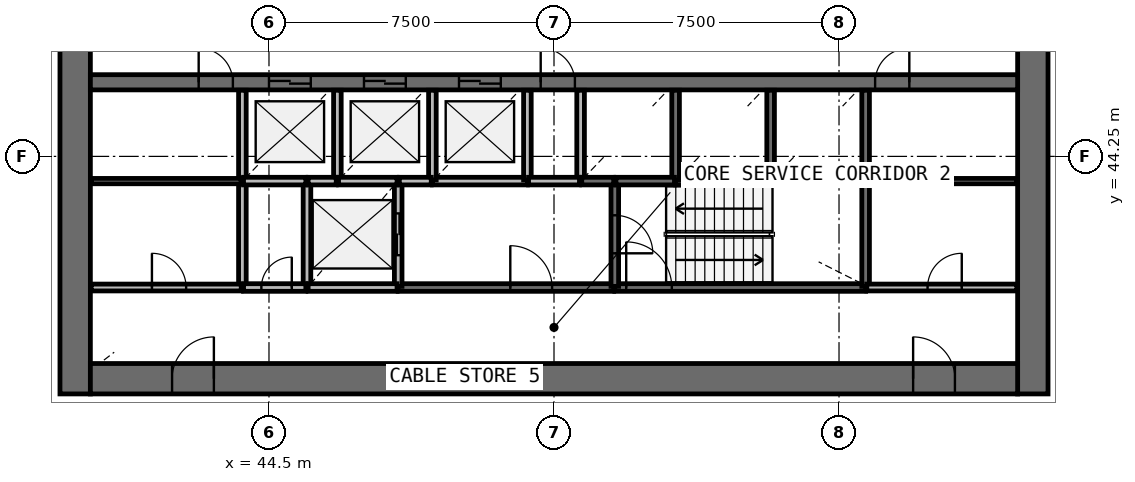
"""IFC4 building model, lengths in metres.
Left out: names, types, materials, properties, quantities, classifications, styles, units other than length and angle.
Written with IfcOpenShell. Run it as: python <this file> out.ifc"""

import sys

from ifc_helpers import new_model, si_unit, direction, frame, frame_2d, origin, place, context, subcontext, project, spatial, rectangle, extrude, source, transform, mapped, element, fill, save


model = new_model("IFC4")
c1 = context("Model", 3, precision=1e-05, world=origin(), true_north=direction((0.0, 1.0)))
c2 = subcontext(c1, "Body", "Model", "MODEL_VIEW")
j1 = project(units=[si_unit("LENGTHUNIT", "METRE"), si_unit("PLANEANGLEUNIT", "RADIAN")], contexts=[c1])
p1 = place(None, origin())
s1 = spatial("IfcSite", under=j1, at=p1, CompositionType="ELEMENT")
p2 = place(p1, origin())
s2 = spatial("IfcBuilding", under=s1, at=p2, CompositionType="ELEMENT")
p3 = place(p2, frame((0.0, 0.0, 120.8)))
s3 = spatial("IfcBuildingStorey", under=s2, at=p3, CompositionType="ELEMENT", Elevation=120.8)
p4 = place(p3, frame((64.6, 38.0, 0.0), z_axis=(0.0, 0.0, 1.0), x_axis=(0.0, 1.0, 0.0)))
e1 = element("IfcWall", 1, at=p4, inside=s3, PredefinedType="SHEAR", context=c2, shape_type="SweptSolid", body=[
    extrude(rectangle(XDim=20.0, YDim=0.8, at=frame_2d((10.0, 0.0))), origin(), (0.0, 0.0, 1.0), 4.1),
])
p5 = place(p4, frame((9.1, 0.0, 0.0)))
e2 = element("IfcOpeningElement", 2, at=p5, cuts=e1, PredefinedType="OPENING", context=c2, shape_type="SweptSolid", body=[
    extrude(rectangle(XDim=1.8, YDim=2.1, at=frame_2d((0.9, 1.05))), frame((0.0, 0.41, 0.0), z_axis=(0.0, -1.0, 0.0), x_axis=(1.0, 0.0, 0.0)), (0.0, 0.0, 1.0), 0.82),
])
p6 = place(p3, frame((39.4, 58.0, 0.0), z_axis=(0.0, 0.0, 1.0), x_axis=(0.0, -1.0, 0.0)))
e3 = element("IfcWall", 3, at=p6, inside=s3, PredefinedType="SHEAR", context=c2, shape_type="SweptSolid", body=[
    extrude(rectangle(XDim=20.0, YDim=0.8, at=frame_2d((10.0, 0.0))), origin(), (0.0, 0.0, 1.0), 4.1),
])
p7 = place(p6, frame((9.1, 0.0, 0.0)))
e4 = element("IfcOpeningElement", 4, at=p7, cuts=e3, PredefinedType="OPENING", context=c2, shape_type="SweptSolid", body=[
    extrude(rectangle(XDim=1.8, YDim=2.1, at=frame_2d((0.9, 1.05))), frame((0.0, 0.41, 0.0), z_axis=(0.0, -1.0, 0.0), x_axis=(1.0, 0.0, 0.0)), (0.0, 0.0, 1.0), 0.82),
])
p8 = place(p3, frame((39.8, 38.4, 0.0), z_axis=(0.0, 0.0, 1.0), x_axis=(1.0, 0.0, 0.0)))
e5 = element("IfcWall", 5, at=p8, inside=s3, PredefinedType="SHEAR", context=c2, shape_type="SweptSolid", body=[
    extrude(rectangle(XDim=24.4, YDim=0.8, at=frame_2d((12.2, 0.0))), origin(), (0.0, 0.0, 1.0), 4.1),
])
p9 = place(p8, frame((21.65, 0.0, 0.0)))
e6 = element("IfcOpeningElement", 6, at=p9, cuts=e5, PredefinedType="OPENING", context=c2, shape_type="SweptSolid", body=[
    extrude(rectangle(XDim=1.1, YDim=2.1, at=frame_2d((0.55, 1.05))), frame((0.0, 0.41, 0.0), z_axis=(0.0, -1.0, 0.0), x_axis=(1.0, 0.0, 0.0)), (0.0, 0.0, 1.0), 0.82),
])
p10 = place(p8, frame((2.15, 0.0, 0.0)))
e7 = element("IfcOpeningElement", 7, at=p10, cuts=e5, PredefinedType="OPENING", context=c2, shape_type="SweptSolid", body=[
    extrude(rectangle(XDim=1.1, YDim=2.1, at=frame_2d((0.55, 1.05))), frame((0.0, 0.41, 0.0), z_axis=(0.0, -1.0, 0.0), x_axis=(1.0, 0.0, 0.0)), (0.0, 0.0, 1.0), 0.82),
])
p11 = place(p3, frame((39.8, 46.2, 0.0), z_axis=(0.0, 0.0, 1.0), x_axis=(1.0, 0.0, 0.0)))
e8 = element("IfcWall", 8, at=p11, inside=s3, PredefinedType="SHEAR", context=c2, shape_type="SweptSolid", body=[
    extrude(rectangle(XDim=24.4, YDim=0.4, at=frame_2d((12.2, 0.0))), origin(), (0.0, 0.0, 1.0), 4.1),
])
p12 = place(p11, frame((4.7, 0.0, 0.0)))
e9 = element("IfcOpeningElement", 9, at=p12, cuts=e8, PredefinedType="OPENING", context=c2, shape_type="SweptSolid", body=[
    extrude(rectangle(XDim=1.1, YDim=2.1, at=frame_2d((0.55, 1.05))), frame((0.0, 0.21, 0.0), z_axis=(0.0, -1.0, 0.0), x_axis=(1.0, 0.0, 0.0)), (0.0, 0.0, 1.0), 0.42),
])
p13 = place(p11, frame((7.2, 0.0, 0.0)))
e10 = element("IfcOpeningElement", 10, at=p13, cuts=e8, PredefinedType="OPENING", context=c2, shape_type="SweptSolid", body=[
    extrude(rectangle(XDim=1.1, YDim=2.1, at=frame_2d((0.55, 1.05))), frame((0.0, 0.21, 0.0), z_axis=(0.0, -1.0, 0.0), x_axis=(1.0, 0.0, 0.0)), (0.0, 0.0, 1.0), 0.42),
])
p14 = place(p11, frame((9.7, 0.0, 0.0)))
e11 = element("IfcOpeningElement", 11, at=p14, cuts=e8, PredefinedType="OPENING", context=c2, shape_type="SweptSolid", body=[
    extrude(rectangle(XDim=1.1, YDim=2.1, at=frame_2d((0.55, 1.05))), frame((0.0, 0.21, 0.0), z_axis=(0.0, -1.0, 0.0), x_axis=(1.0, 0.0, 0.0)), (0.0, 0.0, 1.0), 0.42),
])
p15 = place(p11, frame((20.65, 0.0, 0.0)))
e12 = element("IfcOpeningElement", 12, at=p15, cuts=e8, PredefinedType="OPENING", context=c2, shape_type="SweptSolid", body=[
    extrude(rectangle(XDim=0.9, YDim=2.1, at=frame_2d((0.45, 1.05))), frame((0.0, 0.21, 0.0), z_axis=(0.0, -1.0, 0.0), x_axis=(1.0, 0.0, 0.0)), (0.0, 0.0, 1.0), 0.42),
])
p16 = place(p11, frame((2.85, 0.0, 0.0)))
e13 = element("IfcOpeningElement", 13, at=p16, cuts=e8, PredefinedType="OPENING", context=c2, shape_type="SweptSolid", body=[
    extrude(rectangle(XDim=0.9, YDim=2.1, at=frame_2d((0.45, 1.05))), frame((0.0, 0.21, 0.0), z_axis=(0.0, -1.0, 0.0), x_axis=(1.0, 0.0, 0.0)), (0.0, 0.0, 1.0), 0.42),
])
p17 = place(p11, frame((11.85, 0.0, 0.0)))
e14 = element("IfcOpeningElement", 14, at=p17, cuts=e8, PredefinedType="OPENING", context=c2, shape_type="SweptSolid", body=[
    extrude(rectangle(XDim=0.9, YDim=2.1, at=frame_2d((0.45, 1.05))), frame((0.0, 0.21, 0.0), z_axis=(0.0, -1.0, 0.0), x_axis=(1.0, 0.0, 0.0)), (0.0, 0.0, 1.0), 0.42),
])
p18 = place(p3, frame((53.6, 40.8, 0.0), z_axis=(0.0, 0.0, 1.0), x_axis=(1.0, 0.0, 0.0)))
e15 = element("IfcWall", 15, at=p18, inside=s3, PredefinedType="SOLIDWALL", context=c2, shape_type="SweptSolid", body=[
    extrude(rectangle(XDim=6.6, YDim=0.2, at=frame_2d((3.3, 0.0))), origin(), (0.0, 0.0, 1.0), 3.7),
])
p19 = place(p18, frame((0.3, 0.0, 0.0)))
e16 = element("IfcOpeningElement", 16, at=p19, cuts=e15, PredefinedType="OPENING", context=c2, shape_type="SweptSolid", body=[
    extrude(rectangle(XDim=1.2, YDim=2.1, at=frame_2d((0.6, 1.05))), frame((0.0, 0.11, 0.0), z_axis=(0.0, -1.0, 0.0), x_axis=(1.0, 0.0, 0.0)), (0.0, 0.0, 1.0), 0.22),
])
p20 = place(p3, frame((47.9, 40.8, 0.0), z_axis=(0.0, 0.0, 1.0), x_axis=(1.0, 0.0, 0.0)))
e17 = element("IfcWall", 17, at=p20, inside=s3, PredefinedType="SOLIDWALL", context=c2, shape_type="SweptSolid", body=[
    extrude(rectangle(XDim=5.67, YDim=0.2, at=frame_2d((2.835, 0.0))), origin(), (0.0, 0.0, 1.0), 3.7),
])
p21 = place(p20, frame((2.95, 0.0, 0.0)))
e18 = element("IfcOpeningElement", 18, at=p21, cuts=e17, PredefinedType="OPENING", context=c2, shape_type="SweptSolid", body=[
    extrude(rectangle(XDim=1.1, YDim=2.1, at=frame_2d((0.55, 1.05))), frame((0.0, 0.11, 0.0), z_axis=(0.0, -1.0, 0.0), x_axis=(1.0, 0.0, 0.0)), (0.0, 0.0, 1.0), 0.22),
])
for number, where, z_axis, x_axis in (
    (19, (43.8, 43.6, 0.0), (0.0, 0.0, 1.0), (0.0, -1.0, 0.0)),
    (20, (45.5, 43.6, 0.0), (0.0, 0.0, 1.0), (0.0, -1.0, 0.0)),
):
    element("IfcWall", number, at=place(p3, frame(where, z_axis=z_axis, x_axis=x_axis)), inside=s3, PredefinedType="SOLIDWALL", context=c2, shape_type="SweptSolid", body=[
        extrude(rectangle(XDim=2.8, YDim=0.2, at=frame_2d((1.4, 0.0))), origin(), (0.0, 0.0, 1.0), 3.7),
    ])
p22 = place(p3, frame((47.9, 40.83, 0.0), z_axis=(0.0, 0.0, 1.0), x_axis=(0.0, 1.0, 0.0)))
e21 = element("IfcWall", 21, at=p22, inside=s3, PredefinedType="SOLIDWALL", context=c2, shape_type="SweptSolid", body=[
    extrude(rectangle(XDim=2.77, YDim=0.2, at=frame_2d((1.385, 0.0))), origin(), (0.0, 0.0, 1.0), 3.7),
])
p23 = place(p22, frame((0.82, 0.0, 0.0)))
e22 = element("IfcOpeningElement", 22, at=p23, cuts=e21, PredefinedType="OPENING", context=c2, shape_type="SweptSolid", body=[
    extrude(rectangle(XDim=1.1, YDim=2.1, at=frame_2d((0.55, 1.05))), frame((0.0, 0.11, 0.0), z_axis=(0.0, -1.0, 0.0), x_axis=(1.0, 0.0, 0.0)), (0.0, 0.0, 1.0), 0.22),
])
p24 = place(p3, frame((60.2, 40.83, 0.0), z_axis=(0.0, 0.0, 1.0), x_axis=(0.0, 1.0, 0.0)))
e23 = element("IfcWall", 23, at=p24, inside=s3, PredefinedType="SOLIDWALL", context=c2, shape_type="SweptSolid", body=[
    extrude(rectangle(XDim=2.77, YDim=0.2, at=frame_2d((1.385, 0.0))), origin(), (0.0, 0.0, 1.0), 3.7),
])
p25 = place(p3, frame((53.6, 43.6, 0.0), z_axis=(0.0, 0.0, 1.0), x_axis=(0.0, -1.0, 0.0)))
e24 = element("IfcWall", 24, at=p25, inside=s3, PredefinedType="SOLIDWALL", context=c2, shape_type="SweptSolid", body=[
    extrude(rectangle(XDim=2.77, YDim=0.2, at=frame_2d((1.385, 0.0))), origin(), (0.0, 0.0, 1.0), 3.7),
])
p26 = place(p25, frame((0.9, 0.0, 0.0)))
e25 = element("IfcOpeningElement", 25, at=p26, cuts=e24, PredefinedType="OPENING", context=c2, shape_type="SweptSolid", body=[
    extrude(rectangle(XDim=1.0, YDim=2.1, at=frame_2d((0.5, 1.05))), frame((0.0, 0.11, 0.0), z_axis=(0.0, -1.0, 0.0), x_axis=(1.0, 0.0, 0.0)), (0.0, 0.0, 1.0), 0.22),
])
for number, where, z_axis, x_axis in (
    (26, (48.8, 43.6, 0.0), (0.0, 0.0, 1.0), (1.0, 0.0, 0.0)),
    (27, (55.2, 43.6, 0.0), (0.0, 0.0, 1.0), (1.0, 0.0, 0.0)),
):
    element("IfcWall", number, at=place(p3, frame(where, z_axis=z_axis, x_axis=x_axis)), inside=s3, PredefinedType="SOLIDWALL", context=c2, shape_type="SweptSolid", body=[
        extrude(rectangle(XDim=2.5, YDim=0.2, at=frame_2d((1.25, 0.0))), origin(), (0.0, 0.0, 1.0), 3.7),
    ])
p27 = place(p3, frame((57.73, 43.6, 0.0), z_axis=(0.0, 0.0, 1.0), x_axis=(1.0, 0.0, 0.0)))
e28 = element("IfcWall", 28, at=p27, inside=s3, PredefinedType="SOLIDWALL", context=c2, shape_type="SweptSolid", body=[
    extrude(rectangle(XDim=2.44, YDim=0.2, at=frame_2d((1.22, 0.0))), origin(), (0.0, 0.0, 1.0), 3.7),
])
p28 = place(p3, frame((45.53, 40.8, 0.0), z_axis=(0.0, 0.0, 1.0), x_axis=(1.0, 0.0, 0.0)))
e29 = element("IfcWall", 29, at=p28, inside=s3, PredefinedType="SOLIDWALL", context=c2, shape_type="SweptSolid", body=[
    extrude(rectangle(XDim=2.34, YDim=0.2, at=frame_2d((1.17, 0.0))), origin(), (0.0, 0.0, 1.0), 3.7),
])
p29 = place(p3, frame((43.8, 45.99, 0.0), z_axis=(0.0, 0.0, 1.0), x_axis=(0.0, -1.0, 0.0)))
e30 = element("IfcWall", 30, at=p29, inside=s3, PredefinedType="SOLIDWALL", context=c2, shape_type="SweptSolid", body=[
    extrude(rectangle(XDim=2.36, YDim=0.2, at=frame_2d((1.18, 0.0))), origin(), (0.0, 0.0, 1.0), 3.7),
])
p30 = place(p3, frame((46.3, 43.6, 0.0), z_axis=(0.0, 0.0, 1.0), x_axis=(0.0, 1.0, 0.0)))
e31 = element("IfcWall", 31, at=p30, inside=s3, PredefinedType="SOLIDWALL", context=c2, shape_type="SweptSolid", body=[
    extrude(rectangle(XDim=2.39, YDim=0.2, at=frame_2d((1.195, 0.0))), origin(), (0.0, 0.0, 1.0), 3.7),
])
for number, where, z_axis, x_axis in (
    (32, (48.8, 43.63, 0.0), (0.0, 0.0, 1.0), (0.0, 1.0, 0.0)),
    (33, (51.3, 43.63, 0.0), (0.0, 0.0, 1.0), (0.0, 1.0, 0.0)),
):
    element("IfcWall", number, at=place(p3, frame(where, z_axis=z_axis, x_axis=x_axis)), inside=s3, PredefinedType="SOLIDWALL", context=c2, shape_type="SweptSolid", body=[
        extrude(rectangle(XDim=2.36, YDim=0.2, at=frame_2d((1.18, 0.0))), origin(), (0.0, 0.0, 1.0), 3.7),
    ])
p31 = place(p3, frame((52.7, 45.99, 0.0), z_axis=(0.0, 0.0, 1.0), x_axis=(0.0, -1.0, 0.0)))
e34 = element("IfcWall", 34, at=p31, inside=s3, PredefinedType="SOLIDWALL", context=c2, shape_type="SweptSolid", body=[
    extrude(rectangle(XDim=2.39, YDim=0.2, at=frame_2d((1.195, 0.0))), origin(), (0.0, 0.0, 1.0), 3.7),
])
for number, where, z_axis, x_axis in (
    (35, (55.2, 43.63, 0.0), (0.0, 0.0, 1.0), (0.0, 1.0, 0.0)),
    (36, (57.7, 43.63, 0.0), (0.0, 0.0, 1.0), (0.0, 1.0, 0.0)),
    (37, (60.2, 43.63, 0.0), (0.0, 0.0, 1.0), (0.0, 1.0, 0.0)),
):
    element("IfcWall", number, at=place(p3, frame(where, z_axis=z_axis, x_axis=x_axis)), inside=s3, PredefinedType="SOLIDWALL", context=c2, shape_type="SweptSolid", body=[
        extrude(rectangle(XDim=2.36, YDim=0.2, at=frame_2d((1.18, 0.0))), origin(), (0.0, 0.0, 1.0), 3.7),
    ])
p32 = place(p3, frame((43.83, 43.6, 0.0), z_axis=(0.0, 0.0, 1.0), x_axis=(1.0, 0.0, 0.0)))
e38 = element("IfcWall", 38, at=p32, inside=s3, PredefinedType="SOLIDWALL", context=c2, shape_type="SweptSolid", body=[
    extrude(rectangle(XDim=1.64, YDim=0.2, at=frame_2d((0.82, 0.0))), origin(), (0.0, 0.0, 1.0), 3.7),
])
p33 = place(p3, frame((43.83, 40.8, 0.0), z_axis=(0.0, 0.0, 1.0), x_axis=(1.0, 0.0, 0.0)))
e39 = element("IfcWall", 39, at=p33, inside=s3, PredefinedType="SOLIDWALL", context=c2, shape_type="SweptSolid", body=[
    extrude(rectangle(XDim=1.64, YDim=0.2, at=frame_2d((0.82, 0.0))), origin(), (0.0, 0.0, 1.0), 3.7),
])
p34 = place(p33, frame((0.47, 0.0, 0.0)))
e40 = element("IfcOpeningElement", 40, at=p34, cuts=e39, PredefinedType="OPENING", context=c2, shape_type="SweptSolid", body=[
    extrude(rectangle(XDim=0.8, YDim=2.1, at=frame_2d((0.4, 1.05))), frame((0.0, 0.11, 0.0), z_axis=(0.0, -1.0, 0.0), x_axis=(1.0, 0.0, 0.0)), (0.0, 0.0, 1.0), 0.22),
])
for number, where, z_axis, x_axis in (
    (41, (46.33, 43.6, 0.0), (0.0, 0.0, 1.0), (1.0, 0.0, 0.0)),
    (42, (53.63, 43.6, 0.0), (0.0, 0.0, 1.0), (1.0, 0.0, 0.0)),
):
    element("IfcWall", number, at=place(p3, frame(where, z_axis=z_axis, x_axis=x_axis)), inside=s3, PredefinedType="SOLIDWALL", context=c2, shape_type="SweptSolid", body=[
        extrude(rectangle(XDim=1.54, YDim=0.2, at=frame_2d((0.77, 0.0))), origin(), (0.0, 0.0, 1.0), 3.7),
    ])
p35 = place(p3, frame((52.67, 43.6, 0.0), z_axis=(0.0, 0.0, 1.0), x_axis=(-1.0, 0.0, 0.0)))
e43 = element("IfcWall", 43, at=p35, inside=s3, PredefinedType="SOLIDWALL", context=c2, shape_type="SweptSolid", body=[
    extrude(rectangle(XDim=1.34, YDim=0.2, at=frame_2d((0.67, 0.0))), origin(), (0.0, 0.0, 1.0), 3.7),
])
for number, where, z_axis, x_axis in (
    (44, (47.93, 43.6, 0.0), (0.0, 0.0, 1.0), (1.0, 0.0, 0.0)),
    (45, (52.73, 43.6, 0.0), (0.0, 0.0, 1.0), (1.0, 0.0, 0.0)),
):
    element("IfcWall", number, at=place(p3, frame(where, z_axis=z_axis, x_axis=x_axis)), inside=s3, PredefinedType="SOLIDWALL", context=c2, shape_type="SweptSolid", body=[
        extrude(rectangle(XDim=0.84, YDim=0.2, at=frame_2d((0.42, 0.0))), origin(), (0.0, 0.0, 1.0), 3.7),
    ])
p36 = place(p3, frame((45.53, 43.6, 0.0), z_axis=(0.0, 0.0, 1.0), x_axis=(1.0, 0.0, 0.0)))
e46 = element("IfcWall", 46, at=p36, inside=s3, PredefinedType="SOLIDWALL", context=c2, shape_type="SweptSolid", body=[
    extrude(rectangle(XDim=0.74, YDim=0.2, at=frame_2d((0.37, 0.0))), origin(), (0.0, 0.0, 1.0), 3.7),
])
p37 = place(p3, frame((60.23, 40.8, 0.0), z_axis=(0.0, 0.0, 1.0), x_axis=(1.0, 0.0, 0.0)))
e47 = element("IfcWall", 47, at=p37, inside=s3, PredefinedType="PARTITIONING", context=c2, shape_type="SweptSolid", body=[
    extrude(rectangle(XDim=3.95, YDim=0.18, at=frame_2d((1.975, 0.0))), origin(), (0.0, 0.0, 1.0), 3.7),
])
p38 = place(p37, frame((1.6, 0.0, 0.0)))
e48 = element("IfcOpeningElement", 48, at=p38, cuts=e47, PredefinedType="OPENING", context=c2, shape_type="SweptSolid", body=[
    extrude(rectangle(XDim=0.9, YDim=2.1, at=frame_2d((0.45, 1.05))), frame((0.0, 0.1, 0.0), z_axis=(0.0, -1.0, 0.0), x_axis=(1.0, 0.0, 0.0)), (0.0, 0.0, 1.0), 0.2),
])
p39 = place(p3, frame((39.82, 40.8, 0.0), z_axis=(0.0, 0.0, 1.0), x_axis=(1.0, 0.0, 0.0)))
e49 = element("IfcWall", 49, at=p39, inside=s3, PredefinedType="PARTITIONING", context=c2, shape_type="SweptSolid", body=[
    extrude(rectangle(XDim=3.95, YDim=0.18, at=frame_2d((1.975, 0.0))), origin(), (0.0, 0.0, 1.0), 3.7),
])
p40 = place(p39, frame((1.6, 0.0, 0.0)))
e50 = element("IfcOpeningElement", 50, at=p40, cuts=e49, PredefinedType="OPENING", context=c2, shape_type="SweptSolid", body=[
    extrude(rectangle(XDim=0.9, YDim=2.1, at=frame_2d((0.45, 1.05))), frame((0.0, 0.1, 0.0), z_axis=(0.0, -1.0, 0.0), x_axis=(1.0, 0.0, 0.0)), (0.0, 0.0, 1.0), 0.2),
])
for number, where, z_axis, x_axis in (
    (51, (60.23, 43.6, 0.0), (0.0, 0.0, 1.0), (1.0, 0.0, 0.0)),
    (52, (43.77, 43.6, 0.0), (0.0, 0.0, 1.0), (-1.0, 0.0, 0.0)),
):
    element("IfcWall", number, at=place(p3, frame(where, z_axis=z_axis, x_axis=x_axis)), inside=s3, PredefinedType="PARTITIONING", context=c2, shape_type="SweptSolid", body=[
        extrude(rectangle(XDim=3.95, YDim=0.14, at=frame_2d((1.975, 0.0))), origin(), (0.0, 0.0, 1.0), 2.9),
    ])
m1 = source(origin(), c2, "Body", "SweptSolid", [
    extrude(rectangle(XDim=1.1, YDim=2.1, at=frame_2d((0.55, 1.05))), frame((0.0, 0.025, 0.0), z_axis=(0.0, -1.0, 0.0), x_axis=(1.0, 0.0, 0.0)), (0.0, 0.0, 1.0), 0.05),
])
p41 = place(p12, origin())
e53 = element("IfcDoor", 53, at=p41, inside=s3, OperationType="DOUBLE_DOOR_SLIDING", PredefinedType="USERDEFINED", context=c2, shape_type="MappedRepresentation", body=[
    mapped(m1, transform((0.0, 0.0, 0.0), scale=1.0)),
])
fill(e9, e53)
p42 = place(p13, origin())
e54 = element("IfcDoor", 54, at=p42, inside=s3, OperationType="DOUBLE_DOOR_SLIDING", PredefinedType="USERDEFINED", context=c2, shape_type="MappedRepresentation", body=[
    mapped(m1, transform((0.0, 0.0, 0.0), scale=1.0)),
])
fill(e10, e54)
p43 = place(p14, origin())
e55 = element("IfcDoor", 55, at=p43, inside=s3, OperationType="DOUBLE_DOOR_SLIDING", PredefinedType="USERDEFINED", context=c2, shape_type="MappedRepresentation", body=[
    mapped(m1, transform((0.0, 0.0, 0.0), scale=1.0)),
])
fill(e11, e55)
p44 = place(p23, origin())
e56 = element("IfcDoor", 56, at=p44, inside=s3, OperationType="DOUBLE_DOOR_SLIDING", PredefinedType="USERDEFINED", context=c2, shape_type="MappedRepresentation", body=[
    mapped(m1, transform((0.0, 0.0, 0.0), scale=1.0)),
])
fill(e22, e56)
m2 = source(origin(), c2, "Body", "SweptSolid", [
    extrude(rectangle(XDim=1.2, YDim=2.1, at=frame_2d((0.6, 1.05))), frame((0.0, 0.025, 0.0), z_axis=(0.0, -1.0, 0.0), x_axis=(1.0, 0.0, 0.0)), (0.0, 0.0, 1.0), 0.05),
])
p45 = place(p19, origin())
e57 = element("IfcDoor", 57, at=p45, inside=s3, OperationType="SINGLE_SWING_LEFT", PredefinedType="DOOR", context=c2, shape_type="MappedRepresentation", body=[
    mapped(m2, transform((0.0, 0.0, 0.0), scale=1.0)),
])
fill(e16, e57)
m3 = source(origin(), c2, "Body", "SweptSolid", [
    extrude(rectangle(XDim=1.0, YDim=2.1, at=frame_2d((0.5, 1.05))), frame((0.0, 0.025, 0.0), z_axis=(0.0, -1.0, 0.0), x_axis=(1.0, 0.0, 0.0)), (0.0, 0.0, 1.0), 0.05),
])
p46 = place(p26, origin())
e58 = element("IfcDoor", 58, at=p46, inside=s3, OperationType="SINGLE_SWING_RIGHT", PredefinedType="DOOR", context=c2, shape_type="MappedRepresentation", body=[
    mapped(m3, transform((0.0, 0.0, 0.0), scale=1.0)),
])
fill(e25, e58)
m4 = source(origin(), c2, "Body", "SweptSolid", [
    extrude(rectangle(XDim=1.1, YDim=2.1, at=frame_2d((0.55, 1.05))), frame((0.0, 0.025, 0.0), z_axis=(0.0, -1.0, 0.0), x_axis=(1.0, 0.0, 0.0)), (0.0, 0.0, 1.0), 0.05),
])
p47 = place(p21, origin())
e59 = element("IfcDoor", 59, at=p47, inside=s3, OperationType="SINGLE_SWING_LEFT", PredefinedType="DOOR", context=c2, shape_type="MappedRepresentation", body=[
    mapped(m4, transform((0.0, 0.0, 0.0), scale=1.0)),
])
fill(e18, e59)
m5 = source(origin(), c2, "Body", "SweptSolid", [
    extrude(rectangle(XDim=0.8, YDim=2.1, at=frame_2d((0.4, 1.05))), frame((0.0, 0.025, 0.0), z_axis=(0.0, -1.0, 0.0), x_axis=(1.0, 0.0, 0.0)), (0.0, 0.0, 1.0), 0.05),
])
p48 = place(p34, origin())
e60 = element("IfcDoor", 60, at=p48, inside=s3, OperationType="SINGLE_SWING_RIGHT", PredefinedType="DOOR", context=c2, shape_type="MappedRepresentation", body=[
    mapped(m5, transform((0.0, 0.0, 0.0), scale=1.0)),
])
fill(e40, e60)
m6 = source(origin(), c2, "Body", "SweptSolid", [
    extrude(rectangle(XDim=1.1, YDim=2.1, at=frame_2d((0.55, 1.05))), frame((0.0, 0.025, 0.0), z_axis=(0.0, -1.0, 0.0), x_axis=(1.0, 0.0, 0.0)), (0.0, 0.0, 1.0), 0.05),
])
p49 = place(p9, origin())
e61 = element("IfcDoor", 61, at=p49, inside=s3, OperationType="SINGLE_SWING_LEFT", PredefinedType="DOOR", context=c2, shape_type="MappedRepresentation", body=[
    mapped(m6, transform((0.0, 0.0, 0.0), scale=1.0)),
])
fill(e6, e61)
p50 = place(p10, origin())
e62 = element("IfcDoor", 62, at=p50, inside=s3, OperationType="SINGLE_SWING_RIGHT", PredefinedType="DOOR", context=c2, shape_type="MappedRepresentation", body=[
    mapped(m6, transform((0.0, 0.0, 0.0), scale=1.0)),
])
fill(e7, e62)
m7 = source(origin(), c2, "Body", "SweptSolid", [
    extrude(rectangle(XDim=0.9, YDim=2.1, at=frame_2d((0.45, 1.05))), frame((0.0, 0.025, 0.0), z_axis=(0.0, -1.0, 0.0), x_axis=(1.0, 0.0, 0.0)), (0.0, 0.0, 1.0), 0.05),
])
p51 = place(p40, origin())
e63 = element("IfcDoor", 63, at=p51, inside=s3, OperationType="SINGLE_SWING_LEFT", PredefinedType="DOOR", context=c2, shape_type="MappedRepresentation", body=[
    mapped(m7, transform((0.0, 0.0, 0.0), scale=1.0)),
])
fill(e50, e63)
p52 = place(p15, origin())
e64 = element("IfcDoor", 64, at=p52, inside=s3, OperationType="SINGLE_SWING_RIGHT", PredefinedType="DOOR", context=c2, shape_type="MappedRepresentation", body=[
    mapped(m7, transform((0.0, 0.0, 0.0), scale=1.0)),
])
fill(e12, e64)
p53 = place(p38, origin())
e65 = element("IfcDoor", 65, at=p53, inside=s3, OperationType="SINGLE_SWING_RIGHT", PredefinedType="DOOR", context=c2, shape_type="MappedRepresentation", body=[
    mapped(m7, transform((0.0, 0.0, 0.0), scale=1.0)),
])
fill(e48, e65)
p54 = place(p16, origin())
e66 = element("IfcDoor", 66, at=p54, inside=s3, OperationType="SINGLE_SWING_LEFT", PredefinedType="DOOR", context=c2, shape_type="MappedRepresentation", body=[
    mapped(m7, transform((0.0, 0.0, 0.0), scale=1.0)),
])
fill(e13, e66)
p55 = place(p17, origin())
e67 = element("IfcDoor", 67, at=p55, inside=s3, OperationType="SINGLE_SWING_LEFT", PredefinedType="DOOR", context=c2, shape_type="MappedRepresentation", body=[
    mapped(m7, transform((0.0, 0.0, 0.0), scale=1.0)),
])
fill(e14, e67)
save(model, sys.argv[1])
